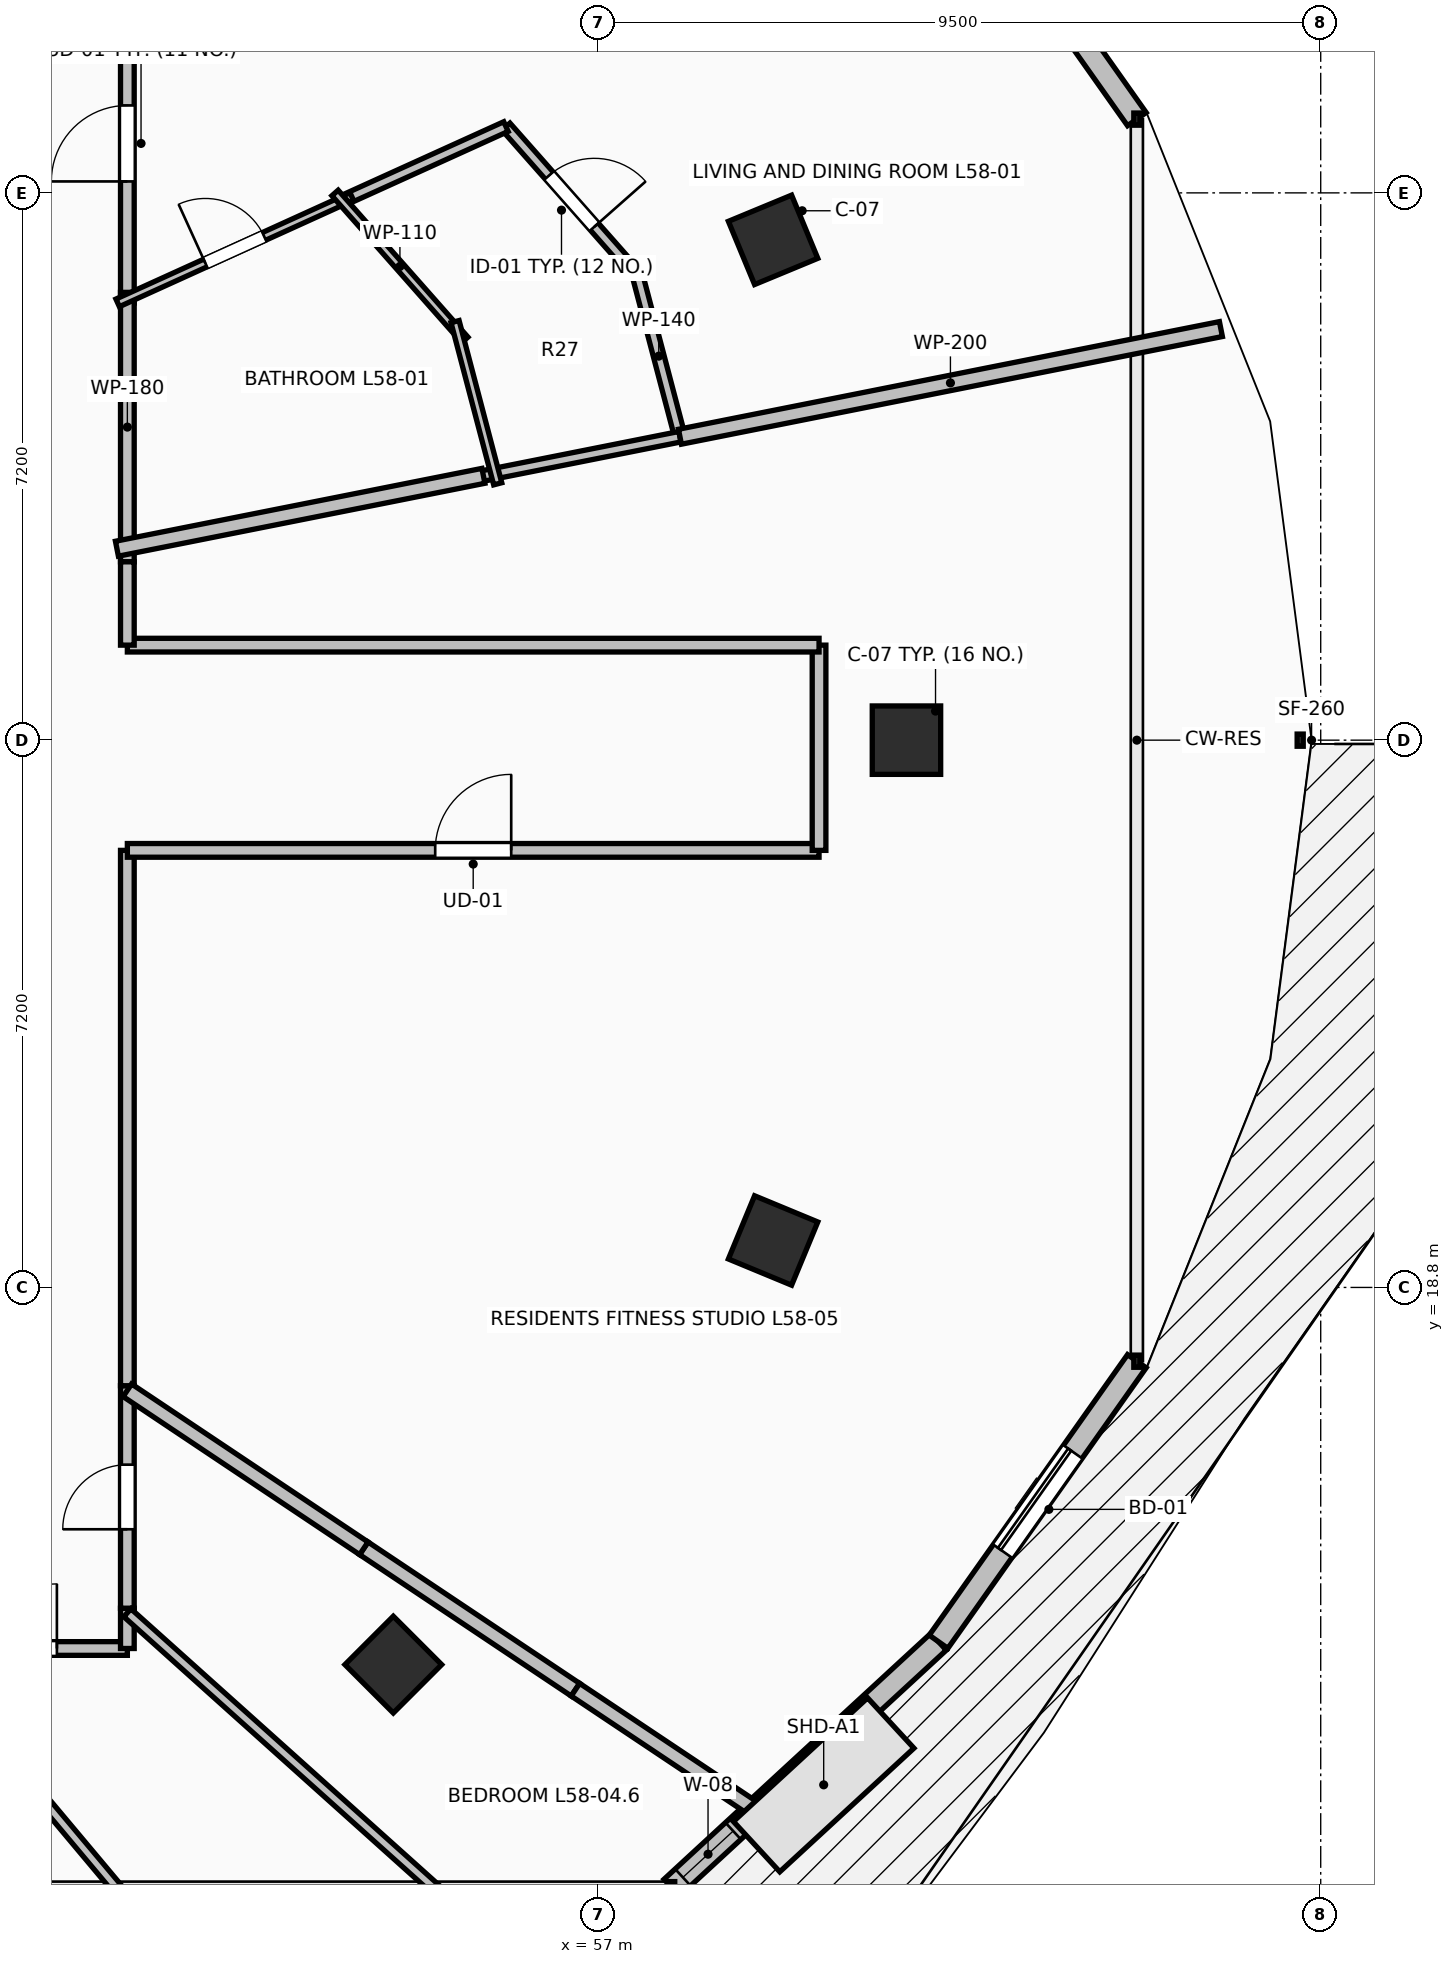
"""IFC4 building model, lengths in metres.
Left out: names, types, materials, properties, quantities, classifications, styles, units other than length and angle.
Written with IfcOpenShell. Run it as: python <this file> out.ifc"""

import sys

from ifc_helpers import new_model, si_unit, direction, frame, frame_2d, origin, origin_2d, place, context, subcontext, project, spatial, rectangle, extrude, element, fill, save


model = new_model("IFC4")
c1 = context("Model", 3, precision=1e-05, world=origin(), true_north=direction((0.0, 1.0)))
c2 = subcontext(c1, "Body", "Model", "MODEL_VIEW")
j1 = project(units=[si_unit("LENGTHUNIT", "METRE"), si_unit("PLANEANGLEUNIT", "RADIAN")], contexts=[c1])
p1 = place(None, origin())
s1 = spatial("IfcSite", under=j1, at=p1, CompositionType="ELEMENT")
p2 = place(p1, origin())
s2 = spatial("IfcBuilding", under=s1, at=p2, CompositionType="ELEMENT")
p3 = place(p2, frame((0.0, 0.0, 214.3)))
s3 = spatial("IfcBuildingStorey", under=s2, at=p3, CompositionType="ELEMENT", Elevation=214.3)
for number, where, z_axis, x_axis in (
    (1, (61.05, 26.0, 0.0), (0.0, 0.0, 1.0), (1.0, 0.0, 0.0)),
    (2, (59.295, 32.582, 0.0), (0.0, 0.0, 1.0), (0.924, 0.383, 0.0)),
    (3, (54.299, 13.838, 0.0), (0.0, 0.0, 1.0), (0.707, -0.707, 0.0)),
    (4, (59.295, 19.418, 0.0), (0.0, 0.0, 1.0), (0.924, -0.383, 0.0)),
):
    element("IfcColumn", number, at=place(p3, frame(where, z_axis=z_axis, x_axis=x_axis)), inside=s3, PredefinedType="COLUMN", context=c2, shape_type="SweptSolid", body=[
        extrude(rectangle(XDim=0.9, YDim=0.9, at=origin_2d()), origin(), (0.0, 0.0, 1.0), 3.55),
    ])
p4 = place(p3, frame((64.081, 34.17, 0.0), z_axis=(0.0, 0.0, 1.0), x_axis=(-0.577168747264, 0.81662490605, 0.0)))
e5 = element("IfcWall", 5, at=p4, inside=s3, PredefinedType="STANDARD", context=c2, shape_type="SweptSolid", body=[
    extrude(rectangle(XDim=4.52, YDim=0.3, at=frame_2d((2.26, 0.0))), origin(), (0.0, 0.0, 1.0), 3.29),
])
p5 = place(p3, frame((57.962, 10.903, 0.0), z_axis=(0.0, 0.0, 1.0), x_axis=(0.735359993374, 0.677676678177, 0.0)))
e6 = element("IfcWall", 6, at=p5, inside=s3, PredefinedType="STANDARD", context=c2, shape_type="SweptSolid", body=[
    extrude(rectangle(XDim=4.774, YDim=0.3, at=frame_2d((2.387, 0.0))), origin(), (0.0, 0.0, 1.0), 3.29),
])
p6 = place(p5, frame((0.2, 0.0, 0.85)))
e7 = element("IfcOpeningElement", 7, at=p6, cuts=e6, PredefinedType="OPENING", context=c2, shape_type="SweptSolid", body=[
    extrude(rectangle(XDim=0.9, YDim=1.8, at=frame_2d((0.45, 0.9))), frame((0.0, 0.165, 0.0), z_axis=(0.0, -1.0, 0.0), x_axis=(1.0, 0.0, 0.0)), (0.0, 0.0, 1.0), 0.33),
])
p7 = place(p3, frame((61.472, 14.139, 0.0), z_axis=(0.0, 0.0, 1.0), x_axis=(0.577168747264, 0.81662490605, 0.0)))
e8 = element("IfcWall", 8, at=p7, inside=s3, PredefinedType="STANDARD", context=c2, shape_type="SweptSolid", body=[
    extrude(rectangle(XDim=4.52, YDim=0.3, at=frame_2d((2.26, 0.0))), origin(), (0.0, 0.0, 1.0), 3.29),
])
p8 = place(p7, frame((1.46, 0.0, 0.0)))
e9 = element("IfcOpeningElement", 9, at=p8, cuts=e8, PredefinedType="OPENING", context=c2, shape_type="SweptSolid", body=[
    extrude(rectangle(XDim=1.6, YDim=2.3, at=frame_2d((0.8, 1.15))), frame((0.0, 0.165, 0.0), z_axis=(0.0, -1.0, 0.0), x_axis=(1.0, 0.0, 0.0)), (0.0, 0.0, 1.0), 0.33),
])
p9 = place(p3, frame((50.8, 31.751, 0.0), z_axis=(0.0, 0.0, 1.0), x_axis=(0.0, 1.0, 0.0)))
e10 = element("IfcWall", 10, at=p9, inside=s3, PredefinedType="PARTITIONING", context=c2, shape_type="SweptSolid", body=[
    extrude(rectangle(XDim=4.199, YDim=0.18, at=frame_2d((2.1, 0.0))), origin(), (0.0, 0.0, 1.0), 2.482),
])
p10 = place(p9, frame((1.6, 0.0, 0.0)))
e11 = element("IfcOpeningElement", 11, at=p10, cuts=e10, PredefinedType="OPENING", context=c2, shape_type="SweptSolid", body=[
    extrude(rectangle(XDim=1.0, YDim=2.15, at=frame_2d((0.5, 1.075))), frame((0.0, 0.105, 0.0), z_axis=(0.0, -1.0, 0.0), x_axis=(1.0, 0.0, 0.0)), (0.0, 0.0, 1.0), 0.21),
])
p11 = place(p3, frame((50.8, 28.346, 0.0), z_axis=(0.0, 0.0, 1.0), x_axis=(0.0, 1.0, 0.0)))
e12 = element("IfcWall", 12, at=p11, inside=s3, PredefinedType="PARTITIONING", context=c2, shape_type="SweptSolid", body=[
    extrude(rectangle(XDim=3.545, YDim=0.18, at=frame_2d((1.772, 0.0))), origin(), (0.0, 0.0, 1.0), 3.29),
])
p12 = place(p3, frame((48.096, 14.05, 0.0), z_axis=(0.0, 0.0, 1.0), x_axis=(1.0, 0.0, 0.0)))
e13 = element("IfcWall", 13, at=p12, inside=s3, PredefinedType="PARTITIONING", context=c2, shape_type="SweptSolid", body=[
    extrude(rectangle(XDim=2.704, YDim=0.18, at=frame_2d((1.352, 0.0))), origin(), (0.0, 0.0, 1.0), 2.482),
])
p13 = place(p12, frame((0.927, 0.0, 0.0)))
e14 = element("IfcOpeningElement", 14, at=p13, cuts=e13, PredefinedType="OPENING", context=c2, shape_type="SweptSolid", body=[
    extrude(rectangle(XDim=0.85, YDim=2.1, at=frame_2d((0.425, 1.05))), frame((0.0, 0.105, 0.0), z_axis=(0.0, -1.0, 0.0), x_axis=(1.0, 0.0, 0.0)), (0.0, 0.0, 1.0), 0.21),
])
p14 = place(p3, frame((50.8, 14.05, 0.0), z_axis=(0.0, 0.0, 1.0), x_axis=(0.0, 1.0, 0.0)))
e15 = element("IfcWall", 15, at=p14, inside=s3, PredefinedType="PARTITIONING", context=c2, shape_type="SweptSolid", body=[
    extrude(rectangle(XDim=0.53, YDim=0.18, at=frame_2d((0.265, 0.0))), origin(), (0.0, 0.0, 1.0), 2.936),
])
p15 = place(p3, frame((50.8, 14.58, 0.0), z_axis=(0.0, 0.0, 1.0), x_axis=(0.0, 1.0, 0.0)))
e16 = element("IfcWall", 16, at=p15, inside=s3, PredefinedType="PARTITIONING", context=c2, shape_type="SweptSolid", body=[
    extrude(rectangle(XDim=2.927, YDim=0.18, at=frame_2d((1.463, 0.0))), origin(), (0.0, 0.0, 1.0), 2.482),
])
p16 = place(p15, frame((1.039, 0.0, 0.0)))
e17 = element("IfcOpeningElement", 17, at=p16, cuts=e16, PredefinedType="OPENING", context=c2, shape_type="SweptSolid", body=[
    extrude(rectangle(XDim=0.85, YDim=2.1, at=frame_2d((0.425, 1.05))), frame((0.0, 0.105, 0.0), z_axis=(0.0, -1.0, 0.0), x_axis=(1.0, 0.0, 0.0)), (0.0, 0.0, 1.0), 0.21),
])
p17 = place(p3, frame((50.8, 17.507, 0.0), z_axis=(0.0, 0.0, 1.0), x_axis=(0.0, 1.0, 0.0)))
e18 = element("IfcWall", 18, at=p17, inside=s3, PredefinedType="PARTITIONING", context=c2, shape_type="SweptSolid", body=[
    extrude(rectangle(XDim=7.043, YDim=0.18, at=frame_2d((3.521, 0.0))), origin(), (0.0, 0.0, 1.0), 2.979),
])
p18 = place(p3, frame((50.8, 24.55, 0.0), z_axis=(0.0, 0.0, 1.0), x_axis=(1.0, 0.0, 0.0)))
e19 = element("IfcWall", 19, at=p18, inside=s3, PredefinedType="PARTITIONING", context=c2, shape_type="SweptSolid", body=[
    extrude(rectangle(XDim=9.1, YDim=0.18, at=frame_2d((4.55, 0.0))), origin(), (0.0, 0.0, 1.0), 2.482),
])
p19 = place(p18, frame((4.05, 0.0, 0.0)))
e20 = element("IfcOpeningElement", 20, at=p19, cuts=e19, PredefinedType="OPENING", context=c2, shape_type="SweptSolid", body=[
    extrude(rectangle(XDim=1.0, YDim=2.15, at=frame_2d((0.5, 1.075))), frame((0.0, 0.105, 0.0), z_axis=(0.0, -1.0, 0.0), x_axis=(1.0, 0.0, 0.0)), (0.0, 0.0, 1.0), 0.21),
])
p20 = place(p3, frame((59.9, 24.55, 0.0), z_axis=(0.0, 0.0, 1.0), x_axis=(0.0, 1.0, 0.0)))
e21 = element("IfcWall", 21, at=p20, inside=s3, PredefinedType="PARTITIONING", context=c2, shape_type="SweptSolid", body=[
    extrude(rectangle(XDim=2.7, YDim=0.18, at=frame_2d((1.35, 0.0))), origin(), (0.0, 0.0, 1.0), 2.482),
])
p21 = place(p3, frame((59.9, 27.25, 0.0), z_axis=(0.0, 0.0, 1.0), x_axis=(-1.0, 0.0, 0.0)))
e22 = element("IfcWall", 22, at=p21, inside=s3, PredefinedType="PARTITIONING", context=c2, shape_type="SweptSolid", body=[
    extrude(rectangle(XDim=9.1, YDim=0.18, at=frame_2d((4.55, 0.0))), origin(), (0.0, 0.0, 1.0), 2.482),
])
p22 = place(p3, frame((50.8, 27.25, 0.0), z_axis=(0.0, 0.0, 1.0), x_axis=(0.0, 1.0, 0.0)))
e23 = element("IfcWall", 23, at=p22, inside=s3, PredefinedType="PARTITIONING", context=c2, shape_type="SweptSolid", body=[
    extrude(rectangle(XDim=1.096, YDim=0.18, at=frame_2d((0.548, 0.0))), origin(), (0.0, 0.0, 1.0), 2.482),
])
p23 = place(p3, frame((55.781, 34.072, 0.0), z_axis=(0.0, 0.0, 1.0), x_axis=(0.661961245166, -0.749538064343, 0.0)))
e24 = element("IfcWall", 24, at=p23, inside=s3, PredefinedType="PARTITIONING", context=c2, shape_type="SweptSolid", body=[
    extrude(rectangle(XDim=2.615, YDim=0.14, at=frame_2d((1.308, 0.0))), origin(), (0.0, 0.0, 1.0), 2.482),
])
p24 = place(p23, frame((0.857, 0.0, 0.0)))
e25 = element("IfcOpeningElement", 25, at=p24, cuts=e24, PredefinedType="OPENING", context=c2, shape_type="SweptSolid", body=[
    extrude(rectangle(XDim=0.9, YDim=2.1, at=frame_2d((0.45, 1.05))), frame((0.0, 0.085, 0.0), z_axis=(0.0, -1.0, 0.0), x_axis=(1.0, 0.0, 0.0)), (0.0, 0.0, 1.0), 0.17),
])
p25 = place(p3, frame((57.512, 32.112, 0.0), z_axis=(0.0, 0.0, 1.0), x_axis=(0.254570039115, -0.967054339314, 0.0)))
e26 = element("IfcWall", 26, at=p25, inside=s3, PredefinedType="PARTITIONING", context=c2, shape_type="SweptSolid", body=[
    extrude(rectangle(XDim=2.192, YDim=0.14, at=frame_2d((1.096, 0.0))), origin(), (0.0, 0.0, 1.0), 3.29),
])
p26 = place(p3, frame((58.07, 29.992, 0.0), z_axis=(0.0, 0.0, 1.0), x_axis=(-0.98076287284, -0.19520293865, 0.0)))
e27 = element("IfcWall", 27, at=p26, inside=s3, PredefinedType="PARTITIONING", context=c2, shape_type="SweptSolid", body=[
    extrude(rectangle(XDim=2.777, YDim=0.14, at=frame_2d((1.388, 0.0))), origin(), (0.0, 0.0, 1.0), 2.936),
])
p27 = place(p3, frame((53.625, 33.094, 0.0), z_axis=(0.0, 0.0, 1.0), x_axis=(0.910680528551, 0.413111334773, 0.0)))
e28 = element("IfcWall", 28, at=p27, inside=s3, PredefinedType="PARTITIONING", context=c2, shape_type="SweptSolid", body=[
    extrude(rectangle(XDim=2.367, YDim=0.14, at=frame_2d((1.184, 0.0))), origin(), (0.0, 0.0, 1.0), 2.482),
])
p28 = place(p3, frame((50.673, 31.753, 0.0), z_axis=(0.0, 0.0, 1.0), x_axis=(0.910504846956, 0.413498396212, 0.0)))
e29 = element("IfcWall", 29, at=p28, inside=s3, PredefinedType="PARTITIONING", context=c2, shape_type="SweptSolid", body=[
    extrude(rectangle(XDim=3.383, YDim=0.11, at=frame_2d((1.691, 0.0))), origin(), (0.0, 0.0, 1.0), 2.482),
])
p29 = place(p28, frame((1.266, 0.0, 0.0)))
e30 = element("IfcOpeningElement", 30, at=p29, cuts=e29, PredefinedType="OPENING", context=c2, shape_type="SweptSolid", body=[
    extrude(rectangle(XDim=0.85, YDim=2.1, at=frame_2d((0.425, 1.05))), frame((0.0, 0.07, 0.0), z_axis=(0.0, -1.0, 0.0), x_axis=(1.0, 0.0, 0.0)), (0.0, 0.0, 1.0), 0.14),
])
p30 = place(p3, frame((58.07, 29.992, 0.0), z_axis=(0.0, 0.0, 1.0), x_axis=(0.980769147175, 0.19517141171, 0.0)))
e31 = element("IfcWall", 31, at=p30, inside=s3, PredefinedType="PARTITIONING", context=c2, shape_type="SweptSolid", body=[
    extrude(rectangle(XDim=7.257, YDim=0.2, at=frame_2d((3.628, 0.0))), origin(), (0.0, 0.0, 1.0), 2.824),
])
p31 = place(p3, frame((53.532, 33.199, 0.0), z_axis=(0.0, 0.0, 1.0), x_axis=(0.662069232061, -0.749442680902, 0.0)))
e32 = element("IfcWall", 32, at=p31, inside=s3, PredefinedType="PARTITIONING", context=c2, shape_type="SweptSolid", body=[
    extrude(rectangle(XDim=2.579, YDim=0.11, at=frame_2d((1.29, 0.0))), origin(), (0.0, 0.0, 1.0), 2.482),
])
p32 = place(p3, frame((55.111, 31.506, 0.0), z_axis=(0.0, 0.0, 1.0), x_axis=(0.254389812051, -0.967101764823, 0.0)))
e33 = element("IfcWall", 33, at=p32, inside=s3, PredefinedType="PARTITIONING", context=c2, shape_type="SweptSolid", body=[
    extrude(rectangle(XDim=2.206, YDim=0.11, at=frame_2d((1.103, 0.0))), origin(), (0.0, 0.0, 1.0), 3.29),
])
p33 = place(p3, frame((50.663, 28.519, 0.0), z_axis=(0.0, 0.0, 1.0), x_axis=(0.980809211653, 0.194969972909, 0.0)))
e34 = element("IfcWall", 34, at=p33, inside=s3, PredefinedType="PARTITIONING", context=c2, shape_type="SweptSolid", body=[
    extrude(rectangle(XDim=4.916, YDim=0.2, at=frame_2d((2.458, 0.0))), origin(), (0.0, 0.0, 1.0), 2.979),
])
p34 = place(p3, frame((49.957, 6.743, 0.0), z_axis=(0.0, 0.0, 1.0), x_axis=(-0.527501342892, 0.849554196769, 0.0)))
e35 = element("IfcWall", 35, at=p34, inside=s3, PredefinedType="PARTITIONING", context=c2, shape_type="SweptSolid", body=[
    extrude(rectangle(XDim=8.601, YDim=0.14, at=frame_2d((4.301, 0.0))), origin(), (0.0, 0.0, 1.0), 2.482),
])
p35 = place(p3, frame((53.083, 8.009, 0.0), z_axis=(0.0, 0.0, 1.0), x_axis=(-0.642484403916, 0.766298760749, 0.0)))
e36 = element("IfcWall", 36, at=p35, inside=s3, PredefinedType="PARTITIONING", context=c2, shape_type="SweptSolid", body=[
    extrude(rectangle(XDim=7.883, YDim=0.14, at=frame_2d((3.942, 0.0))), origin(), (0.0, 0.0, 1.0), 2.482),
])
p36 = place(p3, frame((56.111, 9.757, 0.0), z_axis=(0.0, 0.0, 1.0), x_axis=(-0.744477346253, 0.667647722168, 0.0)))
e37 = element("IfcWall", 37, at=p36, inside=s3, PredefinedType="PARTITIONING", context=c2, shape_type="SweptSolid", body=[
    extrude(rectangle(XDim=7.134, YDim=0.14, at=frame_2d((3.567, 0.0))), origin(), (0.0, 0.0, 1.0), 2.824),
])
p37 = place(p3, frame((56.695, 13.508, 0.0), z_axis=(0.0, 0.0, 1.0), x_axis=(-0.831533913479, 0.55547398745, 0.0)))
e38 = element("IfcWall", 38, at=p37, inside=s3, PredefinedType="PARTITIONING", context=c2, shape_type="SweptSolid", body=[
    extrude(rectangle(XDim=3.348, YDim=0.2, at=frame_2d((1.674, 0.0))), origin(), (0.0, 0.0, 1.0), 2.824),
])
p38 = place(p3, frame((53.911, 15.368, 0.0), z_axis=(0.0, 0.0, 1.0), x_axis=(-0.83140728108, 0.55566350696, 0.0)))
e39 = element("IfcWall", 39, at=p38, inside=s3, PredefinedType="PARTITIONING", context=c2, shape_type="SweptSolid", body=[
    extrude(rectangle(XDim=3.742, YDim=0.2, at=frame_2d((1.871, 0.0))), origin(), (0.0, 0.0, 1.0), 2.936),
])
p39 = place(p3, frame((59.067, 11.924, 0.0), z_axis=(0.0, 0.0, 1.0), x_axis=(-0.831602270354, 0.555371644885, 0.0)))
e40 = element("IfcWall", 40, at=p39, inside=s3, PredefinedType="PARTITIONING", context=c2, shape_type="SweptSolid", body=[
    extrude(rectangle(XDim=2.852, YDim=0.2, at=frame_2d((1.426, 0.0))), origin(), (0.0, 0.0, 1.0), 3.29),
])
p40 = place(p8, origin())
e41 = element("IfcDoor", 41, at=p40, inside=s3, OperationType="SLIDING_TO_LEFT", PredefinedType="DOOR", context=c2, shape_type="SweptSolid", body=[
    extrude(rectangle(XDim=1.6, YDim=2.3, at=frame_2d((0.8, 1.15))), frame((0.0, 0.025, 0.0), z_axis=(0.0, -1.0, 0.0), x_axis=(1.0, 0.0, 0.0)), (0.0, 0.0, 1.0), 0.05),
])
fill(e9, e41)
p41 = place(p6, origin())
e42 = element("IfcWindow", 42, at=p41, inside=s3, PartitioningType="SINGLE_PANEL", PredefinedType="WINDOW", context=c2, shape_type="SweptSolid", body=[
    extrude(rectangle(XDim=0.9, YDim=1.8, at=frame_2d((0.45, 0.9))), frame((0.0, 0.03, 0.0), z_axis=(0.0, -1.0, 0.0), x_axis=(1.0, 0.0, 0.0)), (0.0, 0.0, 1.0), 0.06),
])
fill(e7, e42)
p42 = place(p10, origin())
e43 = element("IfcDoor", 43, at=p42, inside=s3, OperationType="SINGLE_SWING_LEFT", PredefinedType="DOOR", context=c2, shape_type="SweptSolid", body=[
    extrude(rectangle(XDim=1.0, YDim=2.15, at=frame_2d((0.5, 1.075))), frame((0.0, 0.025, 0.0), z_axis=(0.0, -1.0, 0.0), x_axis=(1.0, 0.0, 0.0)), (0.0, 0.0, 1.0), 0.05),
])
fill(e11, e43)
p43 = place(p19, origin())
e44 = element("IfcDoor", 44, at=p43, inside=s3, OperationType="SINGLE_SWING_RIGHT", PredefinedType="DOOR", context=c2, shape_type="SweptSolid", body=[
    extrude(rectangle(XDim=1.0, YDim=2.15, at=frame_2d((0.5, 1.075))), frame((0.0, 0.025, 0.0), z_axis=(0.0, -1.0, 0.0), x_axis=(1.0, 0.0, 0.0)), (0.0, 0.0, 1.0), 0.05),
])
fill(e20, e44)
p44 = place(p24, origin())
e45 = element("IfcDoor", 45, at=p44, inside=s3, OperationType="SINGLE_SWING_RIGHT", PredefinedType="DOOR", context=c2, shape_type="SweptSolid", body=[
    extrude(rectangle(XDim=0.9, YDim=2.1, at=frame_2d((0.45, 1.05))), frame((0.0, 0.025, 0.0), z_axis=(0.0, -1.0, 0.0), x_axis=(1.0, 0.0, 0.0)), (0.0, 0.0, 1.0), 0.05),
])
fill(e25, e45)
p45 = place(p29, origin())
e46 = element("IfcDoor", 46, at=p45, inside=s3, OperationType="SINGLE_SWING_LEFT", PredefinedType="DOOR", context=c2, shape_type="SweptSolid", body=[
    extrude(rectangle(XDim=0.85, YDim=2.1, at=frame_2d((0.425, 1.05))), frame((0.0, 0.025, 0.0), z_axis=(0.0, -1.0, 0.0), x_axis=(1.0, 0.0, 0.0)), (0.0, 0.0, 1.0), 0.05),
])
fill(e30, e46)
p46 = place(p13, origin())
e47 = element("IfcDoor", 47, at=p46, inside=s3, OperationType="SINGLE_SWING_RIGHT", PredefinedType="DOOR", context=c2, shape_type="SweptSolid", body=[
    extrude(rectangle(XDim=0.85, YDim=2.1, at=frame_2d((0.425, 1.05))), frame((0.0, 0.025, 0.0), z_axis=(0.0, -1.0, 0.0), x_axis=(1.0, 0.0, 0.0)), (0.0, 0.0, 1.0), 0.05),
])
fill(e14, e47)
p47 = place(p16, origin())
e48 = element("IfcDoor", 48, at=p47, inside=s3, OperationType="SINGLE_SWING_LEFT", PredefinedType="DOOR", context=c2, shape_type="SweptSolid", body=[
    extrude(rectangle(XDim=0.85, YDim=2.1, at=frame_2d((0.425, 1.05))), frame((0.0, 0.025, 0.0), z_axis=(0.0, -1.0, 0.0), x_axis=(1.0, 0.0, 0.0)), (0.0, 0.0, 1.0), 0.05),
])
fill(e17, e48)
save(model, sys.argv[1])
